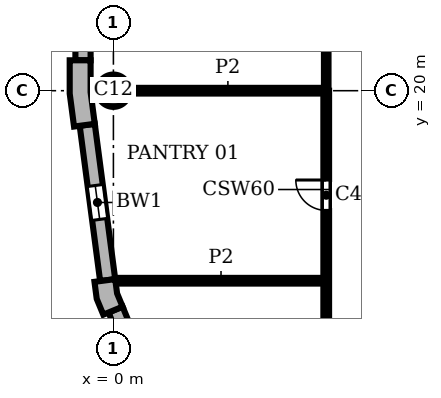
"""IFC4 building model, lengths in metres.
Left out: names, types, materials, properties, quantities, classifications, styles, units other than length and angle.
Written with IfcOpenShell. Run it as: python <this file> out.ifc"""

import sys

from ifc_helpers import new_model, si_unit, direction, frame, frame_2d, origin, origin_2d, place, context, subcontext, project, spatial, polyline, rectangle, circle, outline, extrude, element, fill, save


model = new_model("IFC4")
c1 = context("Model", 3, precision=1e-05, world=origin(), true_north=direction((0.0, 1.0)))
c2 = subcontext(c1, "Body", "Model", "MODEL_VIEW")
j1 = project(units=[si_unit("LENGTHUNIT", "METRE"), si_unit("PLANEANGLEUNIT", "RADIAN")], contexts=[c1])
p1 = place(None, origin())
s1 = spatial("IfcSite", under=j1, at=p1, CompositionType="ELEMENT")
p2 = place(p1, origin())
s2 = spatial("IfcBuilding", under=s1, at=p2, CompositionType="ELEMENT")
p3 = place(p2, frame((0.0, 0.0, 282.6)))
s3 = spatial("IfcBuildingStorey", under=s2, at=p3, CompositionType="ELEMENT", Elevation=282.6)
p4 = place(p3, frame((0.0, 20.0, 0.0), z_axis=(0.0, 0.0, 1.0), x_axis=(1.0, 0.0, 0.0)))
e1 = element("IfcColumn", 1, at=p4, inside=s3, PredefinedType="COLUMN", context=c2, shape_type="SweptSolid", body=[
    extrude(circle(Radius=0.425, at=origin_2d()), origin(), (0.0, 0.0, 1.0), 3.9),
])
p5 = place(p3, origin())
e2 = element("IfcWall", 2, at=p5, inside=s3, PredefinedType="SOLIDWALL", context=c2, shape_type="SweptSolid", body=[
    extrude(outline(polyline([(-1.0, 20.8), (-1.15, 20.8), (-1.15, 19.925), (-1.036, 19.057), (-0.887, 19.076), (-0.49, 19.128), (-0.6, 19.961), (-0.6, 20.8), (-1.0, 20.8)])), origin(), (0.0, 0.0, 1.0), 3.9),
])
e3 = element("IfcWall", 3, at=p5, inside=s3, PredefinedType="SOLIDWALL", context=c2, shape_type="SweptSolid", body=[
    extrude(outline(polyline([(-0.349, 14.99), (-0.498, 14.971), (-0.439, 14.523), (-0.266, 14.106), (-0.128, 14.164), (0.242, 14.317), (0.097, 14.667), (0.047, 15.043), (-0.349, 14.99)])), origin(), (0.0, 0.0, 1.0), 3.9),
])
p6 = place(p3, frame((-0.8, 39.2, 0.0), z_axis=(0.0, 0.0, 1.0), x_axis=(0.0, -1.0, 0.0)))
e4 = element("IfcWall", 4, at=p6, inside=s3, PredefinedType="SOLIDWALL", context=c2, shape_type="SweptSolid", body=[
    extrude(rectangle(XDim=18.4, YDim=0.4, at=frame_2d((9.2, 0.0))), origin(), (0.0, 0.0, 1.0), 3.9),
])
p7 = place(p6, frame((3.75, 0.0, 0.9)))
e5 = element("IfcOpeningElement", 5, at=p7, cuts=e4, PredefinedType="OPENING", context=c2, shape_type="SweptSolid", body=[
    extrude(rectangle(XDim=0.9, YDim=2.35, at=frame_2d((0.45, 1.175))), frame((0.0, 0.21, 0.0), z_axis=(0.0, -1.0, 0.0), x_axis=(1.0, 0.0, 0.0)), (0.0, 0.0, 1.0), 0.42),
])
p8 = place(p6, frame((13.75, 0.0, 0.9)))
e6 = element("IfcOpeningElement", 6, at=p8, cuts=e4, PredefinedType="OPENING", context=c2, shape_type="SweptSolid", body=[
    extrude(rectangle(XDim=0.9, YDim=2.35, at=frame_2d((0.45, 1.175))), frame((0.0, 0.21, 0.0), z_axis=(0.0, -1.0, 0.0), x_axis=(1.0, 0.0, 0.0)), (0.0, 0.0, 1.0), 0.42),
])
p9 = place(p3, frame((-0.689, 19.102, 0.0), z_axis=(0.0, 0.0, 1.0), x_axis=(0.130514280502, -0.991446429508, 0.0)))
e7 = element("IfcWall", 7, at=p9, inside=s3, PredefinedType="SOLIDWALL", context=c2, shape_type="SweptSolid", body=[
    extrude(rectangle(XDim=4.121, YDim=0.4, at=frame_2d((2.061, 0.0))), origin(), (0.0, 0.0, 1.0), 3.9),
])
p10 = place(p9, frame((1.611, 0.0, 0.9)))
e8 = element("IfcOpeningElement", 8, at=p10, cuts=e7, PredefinedType="OPENING", context=c2, shape_type="SweptSolid", body=[
    extrude(rectangle(XDim=0.9, YDim=2.35, at=frame_2d((0.45, 1.175))), frame((0.0, 0.21, 0.0), z_axis=(0.0, -1.0, 0.0), x_axis=(1.0, 0.0, 0.0)), (0.0, 0.0, 1.0), 0.42),
])
p11 = place(p3, frame((0.057, 14.24, 0.0), z_axis=(0.0, 0.0, 1.0), x_axis=(0.382721546029, -0.923863744394, 0.0)))
e9 = element("IfcWall", 9, at=p11, inside=s3, PredefinedType="SOLIDWALL", context=c2, shape_type="SweptSolid", body=[
    extrude(rectangle(XDim=4.121, YDim=0.4, at=frame_2d((2.061, 0.0))), origin(), (0.0, 0.0, 1.0), 3.9),
])
p12 = place(p11, frame((1.611, 0.0, 0.9)))
e10 = element("IfcOpeningElement", 10, at=p12, cuts=e9, PredefinedType="OPENING", context=c2, shape_type="SweptSolid", body=[
    extrude(rectangle(XDim=0.9, YDim=2.35, at=frame_2d((0.45, 1.175))), frame((0.0, 0.21, 0.0), z_axis=(0.0, -1.0, 0.0), x_axis=(1.0, 0.0, 0.0)), (0.0, 0.0, 1.0), 0.42),
])
p13 = place(p3, frame((5.6, 5.6, 0.0), z_axis=(0.0, 0.0, 1.0), x_axis=(0.0, 1.0, 0.0)))
e11 = element("IfcWall", 11, at=p13, inside=s3, PredefinedType="PARTITIONING", context=c2, shape_type="SweptSolid", body=[
    extrude(rectangle(XDim=14.4, YDim=0.15, at=frame_2d((7.2, 0.0))), origin(), (0.0, 0.0, 1.0), 3.58),
])
p14 = place(p13, frame((3.6, 0.0, 0.0)))
e12 = element("IfcOpeningElement", 12, at=p14, cuts=e11, PredefinedType="OPENING", context=c2, shape_type="SweptSolid", body=[
    extrude(rectangle(XDim=1.0, YDim=2.1, at=frame_2d((0.5, 1.05))), frame((0.0, 0.085, 0.0), z_axis=(0.0, -1.0, 0.0), x_axis=(1.0, 0.0, 0.0)), (0.0, 0.0, 1.0), 0.17),
])
p15 = place(p13, frame((11.25, 0.0, 0.0)))
e13 = element("IfcOpeningElement", 13, at=p15, cuts=e11, PredefinedType="OPENING", context=c2, shape_type="SweptSolid", body=[
    extrude(rectangle(XDim=0.8, YDim=2.1, at=frame_2d((0.4, 1.05))), frame((0.0, 0.085, 0.0), z_axis=(0.0, -1.0, 0.0), x_axis=(1.0, 0.0, 0.0)), (0.0, 0.0, 1.0), 0.17),
])
p16 = place(p3, frame((0.063, 15.0, 0.0), z_axis=(0.0, 0.0, 1.0), x_axis=(1.0, 0.0, 0.0)))
e14 = element("IfcWall", 14, at=p16, inside=s3, PredefinedType="PARTITIONING", context=c2, shape_type="SweptSolid", body=[
    extrude(rectangle(XDim=5.537, YDim=0.15, at=frame_2d((2.769, 0.0))), origin(), (0.0, 0.0, 1.0), 3.58),
])
p17 = place(p3, frame((0.425, 20.0, 0.0), z_axis=(0.0, 0.0, 1.0), x_axis=(1.0, 0.0, 0.0)))
e15 = element("IfcWall", 15, at=p17, inside=s3, PredefinedType="PARTITIONING", context=c2, shape_type="SweptSolid", body=[
    extrude(rectangle(XDim=5.175, YDim=0.15, at=frame_2d((2.587, 0.0))), origin(), (0.0, 0.0, 1.0), 3.58),
])
p18 = place(p3, frame((5.6, 20.0, 0.0), z_axis=(0.0, 0.0, 1.0), x_axis=(0.0, 1.0, 0.0)))
e16 = element("IfcWall", 16, at=p18, inside=s3, PredefinedType="PARTITIONING", context=c2, shape_type="SweptSolid", body=[
    extrude(rectangle(XDim=8.0, YDim=0.12, at=frame_2d((4.0, 0.0))), origin(), (0.0, 0.0, 1.0), 3.58),
])
p19 = place(p10, origin())
e17 = element("IfcWindow", 17, at=p19, inside=s3, PartitioningType="SINGLE_PANEL", PredefinedType="WINDOW", context=c2, shape_type="SweptSolid", body=[
    extrude(rectangle(XDim=0.9, YDim=2.35, at=frame_2d((0.45, 1.175))), frame((0.0, 0.16, 0.0), z_axis=(0.0, -1.0, 0.0), x_axis=(1.0, 0.0, 0.0)), (0.0, 0.0, 1.0), 0.06),
])
fill(e8, e17)
p20 = place(p15, origin())
e18 = element("IfcDoor", 18, at=p20, inside=s3, OperationType="SINGLE_SWING_RIGHT", PredefinedType="DOOR", context=c2, shape_type="SweptSolid", body=[
    extrude(rectangle(XDim=0.8, YDim=2.1, at=frame_2d((0.4, 1.05))), frame((0.0, 0.025, 0.0), z_axis=(0.0, -1.0, 0.0), x_axis=(1.0, 0.0, 0.0)), (0.0, 0.0, 1.0), 0.05),
])
fill(e13, e18)
save(model, sys.argv[1])
